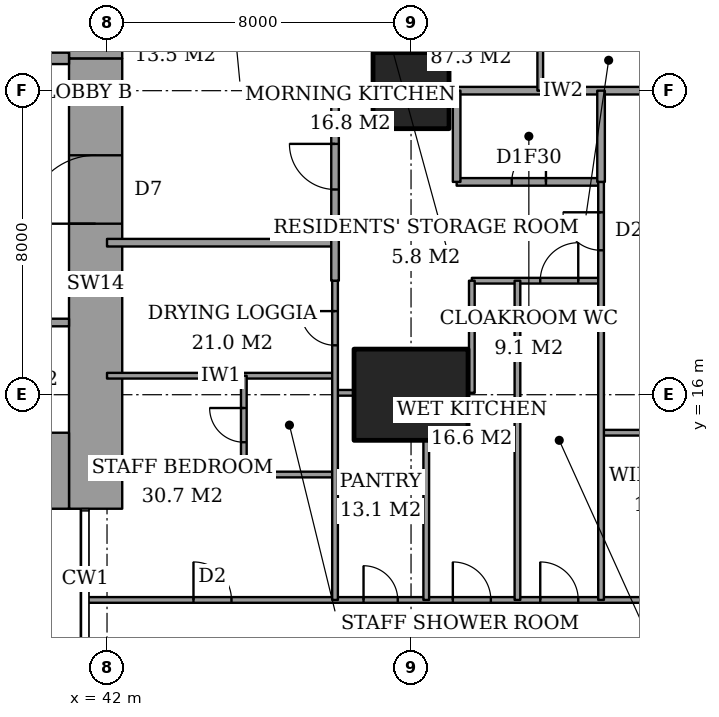
"""IFC4 building model, lengths in metres.
Left out: names, types, materials, properties, quantities, classifications, styles, units other than length and angle.
Written with IfcOpenShell. Run it as: python <this file> out.ifc"""

import sys

from ifc_helpers import new_model, si_unit, direction, frame, frame_2d, origin, origin_2d, place, context, subcontext, project, spatial, rectangle, extrude, element, fill, save


model = new_model("IFC4")
c1 = context("Model", 3, precision=1e-05, world=origin(), true_north=direction((0.0, 1.0)))
c2 = subcontext(c1, "Body", "Model", "MODEL_VIEW")
j1 = project(units=[si_unit("LENGTHUNIT", "METRE"), si_unit("PLANEANGLEUNIT", "RADIAN")], contexts=[c1])
p1 = place(None, origin())
s1 = spatial("IfcSite", under=j1, at=p1, CompositionType="ELEMENT")
p2 = place(p1, origin())
s2 = spatial("IfcBuilding", under=s1, at=p2, CompositionType="ELEMENT")
p3 = place(p2, frame((0.0, 0.0, 146.6)))
s3 = spatial("IfcBuildingStorey", under=s2, at=p3, CompositionType="ELEMENT", Elevation=146.6)
p4 = place(p3, frame((50.0, 16.0, 0.0), z_axis=(0.0, 0.0, 1.0), x_axis=(1.0, 0.0, 0.0)))
e1 = element("IfcColumn", 1, at=p4, inside=s3, PredefinedType="COLUMN", context=c2, shape_type="SweptSolid", body=[
    extrude(rectangle(XDim=3.0, YDim=2.4, at=origin_2d()), origin(), (0.0, 0.0, 1.0), 3.6),
])
p5 = place(p3, frame((50.0, 24.0, 0.0), z_axis=(0.0, 0.0, 1.0), x_axis=(1.0, 0.0, 0.0)))
e2 = element("IfcColumn", 2, at=p5, inside=s3, PredefinedType="COLUMN", context=c2, shape_type="SweptSolid", body=[
    extrude(rectangle(XDim=2.0, YDim=2.0, at=origin_2d()), origin(), (0.0, 0.0, 1.0), 3.6),
])
p6 = place(p3, frame((37.85, 14.0, 0.0), z_axis=(0.0, 0.0, 1.0), x_axis=(1.0, 0.0, 0.0)))
e3 = element("IfcWall", 3, at=p6, inside=s3, PredefinedType="SHEAR", context=c2, shape_type="SweptSolid", body=[
    extrude(rectangle(XDim=3.15, YDim=2.0, at=frame_2d((1.575, 0.0))), origin(), (0.0, 0.0, 1.0), 3.6),
])
p7 = place(p3, frame((41.7, 13.0, 0.0), z_axis=(0.0, 0.0, 1.0), x_axis=(0.0, 1.0, 0.0)))
e4 = element("IfcWall", 4, at=p7, inside=s3, PredefinedType="SHEAR", context=c2, shape_type="SweptSolid", body=[
    extrude(rectangle(XDim=11.85, YDim=1.4, at=frame_2d((5.925, 0.0))), origin(), (0.0, 0.0, 1.0), 3.6),
])
p8 = place(p7, frame((7.5, 0.0, 0.0)))
e5 = element("IfcOpeningElement", 5, at=p8, cuts=e4, PredefinedType="OPENING", context=c2, shape_type="SweptSolid", body=[
    extrude(rectangle(XDim=1.8, YDim=2.4, at=frame_2d((0.9, 1.2))), frame((0.0, 0.71, 0.0), z_axis=(0.0, -1.0, 0.0), x_axis=(1.0, 0.0, 0.0)), (0.0, 0.0, 1.0), 1.42),
])
p9 = place(p3, frame((41.7, 24.85, 0.0), z_axis=(0.0, 0.0, 1.0), x_axis=(0.0, 1.0, 0.0)))
e6 = element("IfcWall", 6, at=p9, inside=s3, PredefinedType="SHEAR", context=c2, shape_type="SweptSolid", body=[
    extrude(rectangle(XDim=10.15, YDim=1.4, at=frame_2d((5.075, 0.0))), origin(), (0.0, 0.0, 1.0), 3.6),
])
p10 = place(p3, frame((37.85, 24.85, 0.0), z_axis=(0.0, 0.0, 1.0), x_axis=(1.0, 0.0, 0.0)))
e7 = element("IfcWall", 7, at=p10, inside=s3, PredefinedType="SHEAR", context=c2, shape_type="SweptSolid", body=[
    extrude(rectangle(XDim=3.15, YDim=0.3, at=frame_2d((1.575, 0.0))), origin(), (0.0, 0.0, 1.0), 3.6),
])
p11 = place(p10, frame((0.95, 0.0, 0.0)))
e8 = element("IfcOpeningElement", 8, at=p11, cuts=e7, PredefinedType="OPENING", context=c2, shape_type="SweptSolid", body=[
    extrude(rectangle(XDim=1.0, YDim=2.1, at=frame_2d((0.5, 1.05))), frame((0.0, 0.16, 0.0), z_axis=(0.0, -1.0, 0.0), x_axis=(1.0, 0.0, 0.0)), (0.0, 0.0, 1.0), 0.32),
])
p12 = place(p3, frame((41.439, 10.6, 0.0), z_axis=(0.0, 0.0, 1.0), x_axis=(1.0, 0.0, 0.0)))
e9 = element("IfcWall", 9, at=p12, inside=s3, PredefinedType="PARTITIONING", context=c2, shape_type="SweptSolid", body=[
    extrude(rectangle(XDim=25.011, YDim=0.15, at=frame_2d((12.505, 0.0))), origin(), (0.0, 0.0, 1.0), 3.35),
])
p13 = place(p12, frame((11.961, 0.0, 0.0)))
e10 = element("IfcOpeningElement", 10, at=p13, cuts=e9, PredefinedType="OPENING", context=c2, shape_type="SweptSolid", body=[
    extrude(rectangle(XDim=1.0, YDim=2.1, at=frame_2d((0.5, 1.05))), frame((0.0, 0.085, 0.0), z_axis=(0.0, -1.0, 0.0), x_axis=(1.0, 0.0, 0.0)), (0.0, 0.0, 1.0), 0.17),
])
p14 = place(p12, frame((20.924, 0.0, 0.0)))
e11 = element("IfcOpeningElement", 11, at=p14, cuts=e9, PredefinedType="OPENING", context=c2, shape_type="SweptSolid", body=[
    extrude(rectangle(XDim=1.0, YDim=2.1, at=frame_2d((0.5, 1.05))), frame((0.0, 0.085, 0.0), z_axis=(0.0, -1.0, 0.0), x_axis=(1.0, 0.0, 0.0)), (0.0, 0.0, 1.0), 0.17),
])
p15 = place(p12, frame((15.249, 0.0, 0.0)))
e12 = element("IfcOpeningElement", 12, at=p15, cuts=e9, PredefinedType="OPENING", context=c2, shape_type="SweptSolid", body=[
    extrude(rectangle(XDim=0.9, YDim=2.1, at=frame_2d((0.45, 1.05))), frame((0.0, 0.085, 0.0), z_axis=(0.0, -1.0, 0.0), x_axis=(1.0, 0.0, 0.0)), (0.0, 0.0, 1.0), 0.17),
])
p16 = place(p12, frame((9.661, 0.0, 0.0)))
e13 = element("IfcOpeningElement", 13, at=p16, cuts=e9, PredefinedType="OPENING", context=c2, shape_type="SweptSolid", body=[
    extrude(rectangle(XDim=1.0, YDim=2.1, at=frame_2d((0.5, 1.05))), frame((0.0, 0.085, 0.0), z_axis=(0.0, -1.0, 0.0), x_axis=(1.0, 0.0, 0.0)), (0.0, 0.0, 1.0), 0.17),
])
p17 = place(p12, frame((7.311, 0.0, 0.0)))
e14 = element("IfcOpeningElement", 14, at=p17, cuts=e9, PredefinedType="OPENING", context=c2, shape_type="SweptSolid", body=[
    extrude(rectangle(XDim=0.9, YDim=2.1, at=frame_2d((0.45, 1.05))), frame((0.0, 0.085, 0.0), z_axis=(0.0, -1.0, 0.0), x_axis=(1.0, 0.0, 0.0)), (0.0, 0.0, 1.0), 0.17),
])
p18 = place(p12, frame((2.836, 0.0, 0.0)))
e15 = element("IfcOpeningElement", 15, at=p18, cuts=e9, PredefinedType="OPENING", context=c2, shape_type="SweptSolid", body=[
    extrude(rectangle(XDim=1.0, YDim=2.1, at=frame_2d((0.5, 1.05))), frame((0.0, 0.085, 0.0), z_axis=(0.0, -1.0, 0.0), x_axis=(1.0, 0.0, 0.0)), (0.0, 0.0, 1.0), 0.17),
])
p19 = place(p3, frame((45.6, 13.9, 0.0), z_axis=(0.0, 0.0, 1.0), x_axis=(1.0, 0.0, 0.0)))
e16 = element("IfcWall", 16, at=p19, inside=s3, PredefinedType="PARTITIONING", context=c2, shape_type="SweptSolid", body=[
    extrude(rectangle(XDim=2.4, YDim=0.15, at=frame_2d((1.2, 0.0))), origin(), (0.0, 0.0, 1.0), 3.35),
])
p20 = place(p3, frame((55.0, 15.0, 0.0), z_axis=(0.0, 0.0, 1.0), x_axis=(1.0, 0.0, 0.0)))
e17 = element("IfcWall", 17, at=p20, inside=s3, PredefinedType="PARTITIONING", context=c2, shape_type="SweptSolid", body=[
    extrude(rectangle(XDim=1.5, YDim=0.15, at=frame_2d((0.75, 0.0))), origin(), (0.0, 0.0, 1.0), 3.35),
])
p21 = place(p3, frame((48.0, 16.05, 0.0), z_axis=(0.0, 0.0, 1.0), x_axis=(1.0, 0.0, 0.0)))
e18 = element("IfcWall", 18, at=p21, inside=s3, PredefinedType="PARTITIONING", context=c2, shape_type="SweptSolid", body=[
    extrude(rectangle(XDim=0.5, YDim=0.15, at=frame_2d((0.25, 0.0))), origin(), (0.0, 0.0, 1.0), 2.634),
])
p22 = place(p3, frame((42.0, 16.5, 0.0), z_axis=(0.0, 0.0, 1.0), x_axis=(1.0, 0.0, 0.0)))
e19 = element("IfcWall", 19, at=p22, inside=s3, PredefinedType="PARTITIONING", context=c2, shape_type="SweptSolid", body=[
    extrude(rectangle(XDim=6.0, YDim=0.15, at=frame_2d((3.0, 0.0))), origin(), (0.0, 0.0, 1.0), 3.35),
])
p23 = place(p3, frame((51.6, 19.0, 0.0), z_axis=(0.0, 0.0, 1.0), x_axis=(1.0, 0.0, 0.0)))
e20 = element("IfcWall", 20, at=p23, inside=s3, PredefinedType="PARTITIONING", context=c2, shape_type="SweptSolid", body=[
    extrude(rectangle(XDim=3.4, YDim=0.15, at=frame_2d((1.7, 0.0))), origin(), (0.0, 0.0, 1.0), 3.35),
])
p24 = place(p23, frame((1.8, 0.0, 0.0)))
e21 = element("IfcOpeningElement", 21, at=p24, cuts=e20, PredefinedType="OPENING", context=c2, shape_type="SweptSolid", body=[
    extrude(rectangle(XDim=1.0, YDim=2.1, at=frame_2d((0.5, 1.05))), frame((0.0, 0.085, 0.0), z_axis=(0.0, -1.0, 0.0), x_axis=(1.0, 0.0, 0.0)), (0.0, 0.0, 1.0), 0.17),
])
p25 = place(p3, frame((42.0, 20.0, 0.0), z_axis=(0.0, 0.0, 1.0), x_axis=(1.0, 0.0, 0.0)))
e22 = element("IfcWall", 22, at=p25, inside=s3, PredefinedType="PARTITIONING", context=c2, shape_type="SweptSolid", body=[
    extrude(rectangle(XDim=6.0, YDim=0.2, at=frame_2d((3.0, 0.0))), origin(), (0.0, 0.0, 1.0), 3.35),
])
p26 = place(p3, frame((51.2, 21.6, 0.0), z_axis=(0.0, 0.0, 1.0), x_axis=(1.0, 0.0, 0.0)))
e23 = element("IfcWall", 23, at=p26, inside=s3, PredefinedType="PARTITIONING", context=c2, shape_type="SweptSolid", body=[
    extrude(rectangle(XDim=3.8, YDim=0.2, at=frame_2d((1.9, 0.0))), origin(), (0.0, 0.0, 1.0), 3.35),
])
p27 = place(p26, frame((1.45, 0.0, 0.0)))
e24 = element("IfcOpeningElement", 24, at=p27, cuts=e23, PredefinedType="OPENING", context=c2, shape_type="SweptSolid", body=[
    extrude(rectangle(XDim=0.9, YDim=2.1, at=frame_2d((0.45, 1.05))), frame((0.0, 0.11, 0.0), z_axis=(0.0, -1.0, 0.0), x_axis=(1.0, 0.0, 0.0)), (0.0, 0.0, 1.0), 0.22),
])
p28 = place(p3, frame((48.0, 24.0, 0.0), z_axis=(0.0, 0.0, 1.0), x_axis=(1.0, 0.0, 0.0)))
e25 = element("IfcWall", 25, at=p28, inside=s3, PredefinedType="PARTITIONING", context=c2, shape_type="SweptSolid", body=[
    extrude(rectangle(XDim=1.0, YDim=0.2, at=frame_2d((0.5, 0.0))), origin(), (0.0, 0.0, 1.0), 3.35),
])
p29 = place(p3, frame((51.0, 24.0, 0.0), z_axis=(0.0, 0.0, 1.0), x_axis=(1.0, 0.0, 0.0)))
e26 = element("IfcWall", 26, at=p29, inside=s3, PredefinedType="PARTITIONING", context=c2, shape_type="SweptSolid", body=[
    extrude(rectangle(XDim=6.0, YDim=0.2, at=frame_2d((3.0, 0.0))), origin(), (0.0, 0.0, 1.0), 3.35),
])
p30 = place(p3, frame((45.6, 13.9, 0.0), z_axis=(0.0, 0.0, 1.0), x_axis=(0.0, 1.0, 0.0)))
e27 = element("IfcWall", 27, at=p30, inside=s3, PredefinedType="PARTITIONING", context=c2, shape_type="SweptSolid", body=[
    extrude(rectangle(XDim=2.6, YDim=0.15, at=frame_2d((1.3, 0.0))), origin(), (0.0, 0.0, 1.0), 3.35),
])
p31 = place(p30, frame((0.85, 0.0, 0.0)))
e28 = element("IfcOpeningElement", 28, at=p31, cuts=e27, PredefinedType="OPENING", context=c2, shape_type="SweptSolid", body=[
    extrude(rectangle(XDim=0.9, YDim=2.1, at=frame_2d((0.45, 1.05))), frame((0.0, 0.085, 0.0), z_axis=(0.0, -1.0, 0.0), x_axis=(1.0, 0.0, 0.0)), (0.0, 0.0, 1.0), 0.17),
])
p32 = place(p3, frame((48.0, 19.0, 0.0), z_axis=(0.0, 0.0, 1.0), x_axis=(0.0, 1.0, 0.0)))
e29 = element("IfcWall", 29, at=p32, inside=s3, PredefinedType="PARTITIONING", context=c2, shape_type="SweptSolid", body=[
    extrude(rectangle(XDim=5.0, YDim=0.2, at=frame_2d((2.5, 0.0))), origin(), (0.0, 0.0, 1.0), 3.35),
])
p33 = place(p32, frame((2.4, 0.0, 0.0)))
e30 = element("IfcOpeningElement", 30, at=p33, cuts=e29, PredefinedType="OPENING", context=c2, shape_type="SweptSolid", body=[
    extrude(rectangle(XDim=1.2, YDim=2.4, at=frame_2d((0.6, 1.2))), frame((0.0, 0.11, 0.0), z_axis=(0.0, -1.0, 0.0), x_axis=(1.0, 0.0, 0.0)), (0.0, 0.0, 1.0), 0.22),
])
p34 = place(p3, frame((48.0, 10.6, 0.0), z_axis=(0.0, 0.0, 1.0), x_axis=(0.0, 1.0, 0.0)))
e31 = element("IfcWall", 31, at=p34, inside=s3, PredefinedType="PARTITIONING", context=c2, shape_type="SweptSolid", body=[
    extrude(rectangle(XDim=8.4, YDim=0.15, at=frame_2d((4.2, 0.0))), origin(), (0.0, 0.0, 1.0), 3.35),
])
p35 = place(p34, frame((6.7, 0.0, 0.0)))
e32 = element("IfcOpeningElement", 32, at=p35, cuts=e31, PredefinedType="OPENING", context=c2, shape_type="SweptSolid", body=[
    extrude(rectangle(XDim=0.9, YDim=2.1, at=frame_2d((0.45, 1.05))), frame((0.0, 0.085, 0.0), z_axis=(0.0, -1.0, 0.0), x_axis=(1.0, 0.0, 0.0)), (0.0, 0.0, 1.0), 0.17),
])
p36 = place(p3, frame((50.4, 10.6, 0.0), z_axis=(0.0, 0.0, 1.0), x_axis=(0.0, 1.0, 0.0)))
e33 = element("IfcWall", 33, at=p36, inside=s3, PredefinedType="PARTITIONING", context=c2, shape_type="SweptSolid", body=[
    extrude(rectangle(XDim=4.2, YDim=0.15, at=frame_2d((2.1, 0.0))), origin(), (0.0, 0.0, 1.0), 3.35),
])
p37 = place(p3, frame((51.2, 21.6, 0.0), z_axis=(0.0, 0.0, 1.0), x_axis=(0.0, 1.0, 0.0)))
e34 = element("IfcWall", 34, at=p37, inside=s3, PredefinedType="PARTITIONING", context=c2, shape_type="SweptSolid", body=[
    extrude(rectangle(XDim=2.4, YDim=0.2, at=frame_2d((1.2, 0.0))), origin(), (0.0, 0.0, 1.0), 3.35),
])
p38 = place(p3, frame((51.6, 16.05, 0.0), z_axis=(0.0, 0.0, 1.0), x_axis=(0.0, 1.0, 0.0)))
e35 = element("IfcWall", 35, at=p38, inside=s3, PredefinedType="PARTITIONING", context=c2, shape_type="SweptSolid", body=[
    extrude(rectangle(XDim=2.95, YDim=0.15, at=frame_2d((1.475, 0.0))), origin(), (0.0, 0.0, 1.0), 3.35),
])
p39 = place(p3, frame((52.8, 10.6, 0.0), z_axis=(0.0, 0.0, 1.0), x_axis=(0.0, 1.0, 0.0)))
e36 = element("IfcWall", 36, at=p39, inside=s3, PredefinedType="PARTITIONING", context=c2, shape_type="SweptSolid", body=[
    extrude(rectangle(XDim=8.4, YDim=0.15, at=frame_2d((4.2, 0.0))), origin(), (0.0, 0.0, 1.0), 3.35),
])
p40 = place(p3, frame((53.4, 24.0, 0.0), z_axis=(0.0, 0.0, 1.0), x_axis=(0.0, 1.0, 0.0)))
e37 = element("IfcWall", 37, at=p40, inside=s3, PredefinedType="PARTITIONING", context=c2, shape_type="SweptSolid", body=[
    extrude(rectangle(XDim=1.6, YDim=0.15, at=frame_2d((0.8, 0.0))), origin(), (0.0, 0.0, 1.0), 3.35),
])
p41 = place(p3, frame((55.0, 21.6, 0.0), z_axis=(0.0, 0.0, 1.0), x_axis=(0.0, 1.0, 0.0)))
e38 = element("IfcWall", 38, at=p41, inside=s3, PredefinedType="PARTITIONING", context=c2, shape_type="SweptSolid", body=[
    extrude(rectangle(XDim=2.4, YDim=0.2, at=frame_2d((1.2, 0.0))), origin(), (0.0, 0.0, 1.0), 3.35),
])
p42 = place(p3, frame((55.0, 10.6, 0.0), z_axis=(0.0, 0.0, 1.0), x_axis=(0.0, 1.0, 0.0)))
e39 = element("IfcWall", 39, at=p42, inside=s3, PredefinedType="PARTITIONING", context=c2, shape_type="SweptSolid", body=[
    extrude(rectangle(XDim=11.0, YDim=0.15, at=frame_2d((5.5, 0.0))), origin(), (0.0, 0.0, 1.0), 3.35),
])
p43 = place(p42, frame((9.2, 0.0, 0.0)))
e40 = element("IfcOpeningElement", 40, at=p43, cuts=e39, PredefinedType="OPENING", context=c2, shape_type="SweptSolid", body=[
    extrude(rectangle(XDim=1.0, YDim=2.1, at=frame_2d((0.5, 1.05))), frame((0.0, 0.085, 0.0), z_axis=(0.0, -1.0, 0.0), x_axis=(1.0, 0.0, 0.0)), (0.0, 0.0, 1.0), 0.17),
])
p44 = place(p3, frame((28.3, 17.9, 0.0), z_axis=(0.0, 0.0, 1.0), x_axis=(1.0, 0.0, 0.0)))
e41 = element("IfcWall", 41, at=p44, inside=s3, PredefinedType="PARTITIONING", context=c2, shape_type="SweptSolid", body=[
    extrude(rectangle(XDim=12.7, YDim=0.2, at=frame_2d((6.35, 0.0))), origin(), (0.0, 0.0, 1.0), 3.6),
])
p45 = place(p44, frame((0.95, 0.0, 0.0)))
e42 = element("IfcOpeningElement", 42, at=p45, cuts=e41, PredefinedType="OPENING", context=c2, shape_type="SweptSolid", body=[
    extrude(rectangle(XDim=1.1, YDim=2.1, at=frame_2d((0.55, 1.05))), frame((0.0, 0.11, 0.0), z_axis=(0.0, -1.0, 0.0), x_axis=(1.0, 0.0, 0.0)), (0.0, 0.0, 1.0), 0.22),
])
p46 = place(p44, frame((4.15, 0.0, 0.0)))
e43 = element("IfcOpeningElement", 43, at=p46, cuts=e41, PredefinedType="OPENING", context=c2, shape_type="SweptSolid", body=[
    extrude(rectangle(XDim=1.1, YDim=2.1, at=frame_2d((0.55, 1.05))), frame((0.0, 0.11, 0.0), z_axis=(0.0, -1.0, 0.0), x_axis=(1.0, 0.0, 0.0)), (0.0, 0.0, 1.0), 0.22),
])
p47 = place(p44, frame((7.35, 0.0, 0.0)))
e44 = element("IfcOpeningElement", 44, at=p47, cuts=e41, PredefinedType="OPENING", context=c2, shape_type="SweptSolid", body=[
    extrude(rectangle(XDim=1.1, YDim=2.1, at=frame_2d((0.55, 1.05))), frame((0.0, 0.11, 0.0), z_axis=(0.0, -1.0, 0.0), x_axis=(1.0, 0.0, 0.0)), (0.0, 0.0, 1.0), 0.22),
])
p48 = place(p44, frame((10.6, 0.0, 0.0)))
e45 = element("IfcOpeningElement", 45, at=p48, cuts=e41, PredefinedType="OPENING", context=c2, shape_type="SweptSolid", body=[
    extrude(rectangle(XDim=1.2, YDim=2.1, at=frame_2d((0.6, 1.05))), frame((0.0, 0.11, 0.0), z_axis=(0.0, -1.0, 0.0), x_axis=(1.0, 0.0, 0.0)), (0.0, 0.0, 1.0), 0.22),
])
p49 = place(p13, origin())
e46 = element("IfcDoor", 46, at=p49, inside=s3, OperationType="SINGLE_SWING_RIGHT", PredefinedType="DOOR", context=c2, shape_type="SweptSolid", body=[
    extrude(rectangle(XDim=1.0, YDim=2.1, at=frame_2d((0.5, 1.05))), frame((0.0, 0.025, 0.0), z_axis=(0.0, -1.0, 0.0), x_axis=(1.0, 0.0, 0.0)), (0.0, 0.0, 1.0), 0.05),
])
fill(e10, e46)
p50 = place(p43, origin())
e47 = element("IfcDoor", 47, at=p50, inside=s3, OperationType="SINGLE_SWING_LEFT", PredefinedType="DOOR", context=c2, shape_type="SweptSolid", body=[
    extrude(rectangle(XDim=1.0, YDim=2.1, at=frame_2d((0.5, 1.05))), frame((0.0, 0.025, 0.0), z_axis=(0.0, -1.0, 0.0), x_axis=(1.0, 0.0, 0.0)), (0.0, 0.0, 1.0), 0.05),
])
fill(e40, e47)
p51 = place(p27, origin())
e48 = element("IfcDoor", 48, at=p51, inside=s3, OperationType="SINGLE_SWING_LEFT", PredefinedType="DOOR", context=c2, shape_type="SweptSolid", body=[
    extrude(rectangle(XDim=0.9, YDim=2.1, at=frame_2d((0.45, 1.05))), frame((0.0, 0.025, 0.0), z_axis=(0.0, -1.0, 0.0), x_axis=(1.0, 0.0, 0.0)), (0.0, 0.0, 1.0), 0.05),
])
fill(e24, e48)
p52 = place(p33, origin())
e49 = element("IfcDoor", 49, at=p52, inside=s3, OperationType="SINGLE_SWING_LEFT", PredefinedType="DOOR", context=c2, shape_type="SweptSolid", body=[
    extrude(rectangle(XDim=1.2, YDim=2.4, at=frame_2d((0.6, 1.2))), frame((0.0, 0.025, 0.0), z_axis=(0.0, -1.0, 0.0), x_axis=(1.0, 0.0, 0.0)), (0.0, 0.0, 1.0), 0.05),
])
fill(e30, e49)
p53 = place(p24, origin())
e50 = element("IfcDoor", 50, at=p53, inside=s3, OperationType="SINGLE_SWING_LEFT", PredefinedType="DOOR", context=c2, shape_type="SweptSolid", body=[
    extrude(rectangle(XDim=1.0, YDim=2.1, at=frame_2d((0.5, 1.05))), frame((0.0, 0.025, 0.0), z_axis=(0.0, -1.0, 0.0), x_axis=(1.0, 0.0, 0.0)), (0.0, 0.0, 1.0), 0.05),
])
fill(e21, e50)
p54 = place(p16, origin())
e51 = element("IfcDoor", 51, at=p54, inside=s3, OperationType="SINGLE_SWING_RIGHT", PredefinedType="DOOR", context=c2, shape_type="SweptSolid", body=[
    extrude(rectangle(XDim=1.0, YDim=2.1, at=frame_2d((0.5, 1.05))), frame((0.0, 0.025, 0.0), z_axis=(0.0, -1.0, 0.0), x_axis=(1.0, 0.0, 0.0)), (0.0, 0.0, 1.0), 0.05),
])
fill(e13, e51)
p55 = place(p17, origin())
e52 = element("IfcDoor", 52, at=p55, inside=s3, OperationType="SINGLE_SWING_RIGHT", PredefinedType="DOOR", context=c2, shape_type="SweptSolid", body=[
    extrude(rectangle(XDim=0.9, YDim=2.1, at=frame_2d((0.45, 1.05))), frame((0.0, 0.025, 0.0), z_axis=(0.0, -1.0, 0.0), x_axis=(1.0, 0.0, 0.0)), (0.0, 0.0, 1.0), 0.05),
])
fill(e14, e52)
p56 = place(p31, origin())
e53 = element("IfcDoor", 53, at=p56, inside=s3, OperationType="SINGLE_SWING_LEFT", PredefinedType="DOOR", context=c2, shape_type="SweptSolid", body=[
    extrude(rectangle(XDim=0.9, YDim=2.1, at=frame_2d((0.45, 1.05))), frame((0.0, 0.025, 0.0), z_axis=(0.0, -1.0, 0.0), x_axis=(1.0, 0.0, 0.0)), (0.0, 0.0, 1.0), 0.05),
])
fill(e28, e53)
p57 = place(p18, origin())
e54 = element("IfcDoor", 54, at=p57, inside=s3, OperationType="SINGLE_SWING_RIGHT", PredefinedType="DOOR", context=c2, shape_type="SweptSolid", body=[
    extrude(rectangle(XDim=1.0, YDim=2.1, at=frame_2d((0.5, 1.05))), frame((0.0, 0.025, 0.0), z_axis=(0.0, -1.0, 0.0), x_axis=(1.0, 0.0, 0.0)), (0.0, 0.0, 1.0), 0.05),
])
fill(e15, e54)
p58 = place(p35, origin())
e55 = element("IfcDoor", 55, at=p58, inside=s3, OperationType="SINGLE_SWING_LEFT", PredefinedType="DOOR", context=c2, shape_type="SweptSolid", body=[
    extrude(rectangle(XDim=0.9, YDim=2.1, at=frame_2d((0.45, 1.05))), frame((0.0, 0.025, 0.0), z_axis=(0.0, -1.0, 0.0), x_axis=(1.0, 0.0, 0.0)), (0.0, 0.0, 1.0), 0.05),
])
fill(e32, e55)
p59 = place(p8, origin())
e56 = element("IfcDoor", 56, at=p59, inside=s3, OperationType="DOUBLE_DOOR_DOUBLE_SWING", PredefinedType="DOOR", context=c2, shape_type="SweptSolid", body=[
    extrude(rectangle(XDim=1.8, YDim=2.4, at=frame_2d((0.9, 1.2))), frame((0.0, 0.025, 0.0), z_axis=(0.0, -1.0, 0.0), x_axis=(1.0, 0.0, 0.0)), (0.0, 0.0, 1.0), 0.05),
])
fill(e5, e56)
save(model, sys.argv[1])
